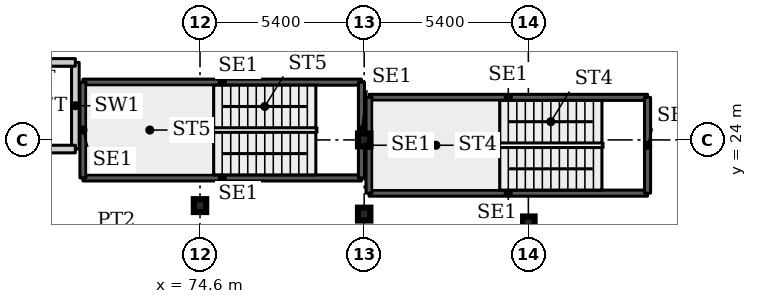
"""IFC4 building model, lengths in metres.
Left out: names, types, materials, properties, quantities, classifications, styles, units other than length and angle.
Written with IfcOpenShell. Run it as: python <this file> out.ifc"""

import sys

from ifc_helpers import new_model, si_unit, direction, frame, frame_2d, origin, origin_2d, place, context, subcontext, project, spatial, rectangle, i_section, extrude, element, save


model = new_model("IFC4")
c1 = context("Model", 3, precision=1e-05, world=origin(), true_north=direction((0.0, 1.0)))
c2 = subcontext(c1, "Body", "Model", "MODEL_VIEW")
j1 = project(units=[si_unit("LENGTHUNIT", "METRE"), si_unit("PLANEANGLEUNIT", "RADIAN")], contexts=[c1])
p1 = place(None, origin())
s1 = spatial("IfcSite", under=j1, at=p1, CompositionType="ELEMENT")
p2 = place(p1, origin())
s2 = spatial("IfcBuilding", under=s1, at=p2, CompositionType="ELEMENT")
p3 = place(p2, frame((0.0, 0.0, 12.5)))
s3 = spatial("IfcBuildingStorey", under=s2, at=p3, CompositionType="ELEMENT", Elevation=12.5)
for number, where, z_axis, x_axis in (
    (1, (80.0, 24.0, 0.0), (0.0, 0.0, 1.0), (1.0, 0.0, 0.0)),
    (2, (85.4, 21.27, 0.0), (0.0, 0.0, 1.0), (1.0, 0.0, 0.0)),
    (3, (80.0, 21.56, 0.0), (0.0, 0.0, 1.0), (1.0, 0.0, 0.0)),
    (4, (74.6, 21.84, 0.0), (0.0, 0.0, 1.0), (1.0, 0.0, 0.0)),
):
    element("IfcColumn", number, at=place(p3, frame(where, z_axis=z_axis, x_axis=x_axis)), inside=s3, PredefinedType="COLUMN", context=c2, shape_type="SweptSolid", body=[
        extrude(i_section(OverallWidth=0.409, OverallDepth=0.425, WebThickness=0.033, FlangeThickness=0.052, FilletRadius=0.013, at=origin_2d()), origin(), (0.0, 0.0, 1.0), 4.5),
    ])
for number, where, z_axis, x_axis in (
    (5, (80.16, 22.25, 0.0), (0.0, 0.0, 1.0), (1.0, 0.0, 0.0)),
    (6, (80.16, 25.4, 0.0), (0.0, 0.0, 1.0), (1.0, 0.0, 0.0)),
):
    element("IfcWall", number, at=place(p3, frame(where, z_axis=z_axis, x_axis=x_axis)), inside=s3, PredefinedType="SHEAR", context=c2, shape_type="SweptSolid", body=[
        extrude(rectangle(XDim=9.16, YDim=0.2, at=frame_2d((4.58, 0.0))), origin(), (0.0, 0.0, 1.0), 4.5),
    ])
for number, where, z_axis, x_axis in (
    (7, (80.16, 22.25, 0.0), (0.0, 0.0, 1.0), (0.0, 1.0, 0.0)),
    (8, (89.32, 22.25, 0.0), (0.0, 0.0, 1.0), (0.0, 1.0, 0.0)),
):
    element("IfcWall", number, at=place(p3, frame(where, z_axis=z_axis, x_axis=x_axis)), inside=s3, PredefinedType="SHEAR", context=c2, shape_type="SweptSolid", body=[
        extrude(rectangle(XDim=3.15, YDim=0.2, at=frame_2d((1.575, 0.0))), origin(), (0.0, 0.0, 1.0), 4.5),
    ])
for number, where, z_axis, x_axis in (
    (9, (70.75, 22.75, 0.0), (0.0, 0.0, 1.0), (1.0, 0.0, 0.0)),
    (10, (70.75, 25.9, 0.0), (0.0, 0.0, 1.0), (1.0, 0.0, 0.0)),
):
    element("IfcWall", number, at=place(p3, frame(where, z_axis=z_axis, x_axis=x_axis)), inside=s3, PredefinedType="SHEAR", context=c2, shape_type="SweptSolid", body=[
        extrude(rectangle(XDim=9.16, YDim=0.2, at=frame_2d((4.58, 0.0))), origin(), (0.0, 0.0, 1.0), 4.5),
    ])
for number, where, z_axis, x_axis in (
    (11, (70.75, 22.75, 0.0), (0.0, 0.0, 1.0), (0.0, 1.0, 0.0)),
    (12, (79.91, 22.75, 0.0), (0.0, 0.0, 1.0), (0.0, 1.0, 0.0)),
):
    element("IfcWall", number, at=place(p3, frame(where, z_axis=z_axis, x_axis=x_axis)), inside=s3, PredefinedType="SHEAR", context=c2, shape_type="SweptSolid", body=[
        extrude(rectangle(XDim=3.15, YDim=0.2, at=frame_2d((1.575, 0.0))), origin(), (0.0, 0.0, 1.0), 4.5),
    ])
p4 = place(p3, frame((70.5, 23.7, 0.0), z_axis=(0.0, 0.0, 1.0), x_axis=(0.0, 1.0, 0.0)))
e13 = element("IfcWall", 13, at=p4, inside=s3, PredefinedType="PARTITIONING", context=c2, shape_type="SweptSolid", body=[
    extrude(rectangle(XDim=2.85, YDim=0.25, at=frame_2d((1.425, 0.0))), origin(), (0.0, 0.0, 1.0), 4.5),
])
for number, where, z_axis, x_axis in (
    (14, (53.4, 23.7, 0.0), (0.0, 0.0, 1.0), (1.0, 0.0, 0.0)),
    (15, (53.4, 26.55, 0.0), (0.0, 0.0, 1.0), (1.0, 0.0, 0.0)),
):
    element("IfcWall", number, at=place(p3, frame(where, z_axis=z_axis, x_axis=x_axis)), inside=s3, PredefinedType="PARTITIONING", context=c2, shape_type="SweptSolid", body=[
        extrude(rectangle(XDim=17.1, YDim=0.25, at=frame_2d((8.55, 0.0))), origin(), (0.0, 0.0, 1.0), 4.5),
    ])
save(model, sys.argv[1])
